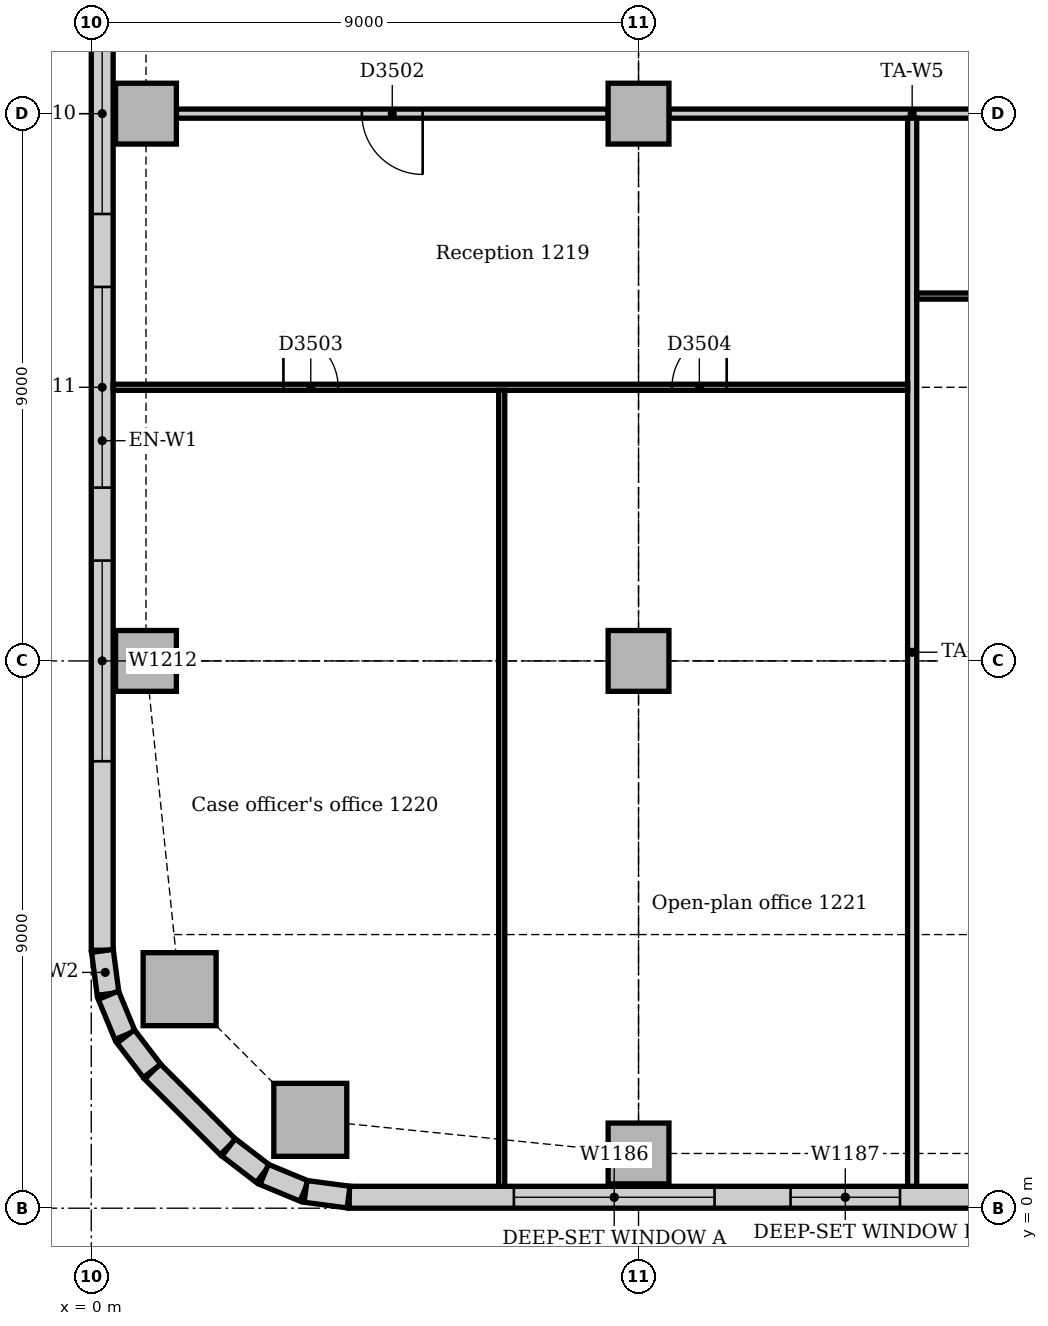
"""IFC4 building model, lengths in metres.
Left out: names, types, materials, properties, quantities, classifications, styles, units other than length and angle.
Written with IfcOpenShell. Run it as: python <this file> out.ifc"""

import sys

from ifc_helpers import new_model, si_unit, direction, frame, frame_2d, origin, origin_2d, place, context, subcontext, project, spatial, rectangle, extrude, element, fill, save


model = new_model("IFC4")
c1 = context("Model", 3, precision=1e-05, world=origin(), true_north=direction((0.0, 1.0)))
c2 = subcontext(c1, "Body", "Model", "MODEL_VIEW")
j1 = project(units=[si_unit("LENGTHUNIT", "METRE"), si_unit("PLANEANGLEUNIT", "RADIAN")], contexts=[c1])
p1 = place(None, origin())
s1 = spatial("IfcSite", under=j1, at=p1, CompositionType="ELEMENT")
p2 = place(p1, origin())
s2 = spatial("IfcBuilding", under=s1, at=p2, CompositionType="ELEMENT")
p3 = place(p2, frame((0.0, 0.0, 55.0)))
s3 = spatial("IfcBuildingStorey", under=s2, at=p3, CompositionType="ELEMENT", Elevation=55.0)
for number, where, z_axis, x_axis in (
    (1, (3.602, 1.453, 0.0), (0.0, 0.0, 1.0), (1.0, 0.0, 0.0)),
    (2, (1.453, 3.602, 0.0), (0.0, 0.0, 1.0), (1.0, 0.0, 0.0)),
):
    element("IfcColumn", number, at=place(p3, frame(where, z_axis=z_axis, x_axis=x_axis)), inside=s3, PredefinedType="COLUMN", context=c2, shape_type="SweptSolid", body=[
        extrude(rectangle(XDim=1.2, YDim=1.2, at=origin_2d()), origin(), (0.0, 0.0, 1.0), 3.85),
    ])
for number, where, z_axis, x_axis in (
    (3, (9.0, 0.9, 0.0), (0.0, 0.0, 1.0), (1.0, 0.0, 0.0)),
    (4, (0.9, 9.0, 0.0), (0.0, 0.0, 1.0), (1.0, 0.0, 0.0)),
    (5, (0.9, 18.0, 0.0), (0.0, 0.0, 1.0), (1.0, 0.0, 0.0)),
    (6, (9.0, 9.0, 0.0), (0.0, 0.0, 1.0), (1.0, 0.0, 0.0)),
    (7, (9.0, 18.0, 0.0), (0.0, 0.0, 1.0), (1.0, 0.0, 0.0)),
):
    element("IfcColumn", number, at=place(p3, frame(where, z_axis=z_axis, x_axis=x_axis)), inside=s3, PredefinedType="COLUMN", context=c2, shape_type="SweptSolid", body=[
        extrude(rectangle(XDim=1.0, YDim=1.0, at=origin_2d()), origin(), (0.0, 0.0, 1.0), 3.85),
    ])
p4 = place(p3, frame((4.243, 0.18, 0.0), z_axis=(0.0, 0.0, 1.0), x_axis=(1.0, 0.0, 0.0)))
e8 = element("IfcWall", 8, at=p4, inside=s3, PredefinedType="STANDARD", context=c2, shape_type="SweptSolid", body=[
    extrude(rectangle(XDim=44.015, YDim=0.36, at=frame_2d((22.007, 0.0))), origin(), (0.0, 0.0, 1.0), 3.85),
])
p5 = place(p4, frame((2.707, 0.0, 0.9)))
e9 = element("IfcOpeningElement", 9, at=p5, cuts=e8, PredefinedType="OPENING", context=c2, shape_type="SweptSolid", body=[
    extrude(rectangle(XDim=3.3, YDim=1.6, at=frame_2d((1.65, 0.8))), frame((0.0, 0.19, 0.0), z_axis=(0.0, -1.0, 0.0), x_axis=(1.0, 0.0, 0.0)), (0.0, 0.0, 1.0), 0.38),
])
p6 = place(p4, frame((7.257, 0.0, 0.9)))
e10 = element("IfcOpeningElement", 10, at=p6, cuts=e8, PredefinedType="OPENING", context=c2, shape_type="SweptSolid", body=[
    extrude(rectangle(XDim=1.8, YDim=1.6, at=frame_2d((0.9, 0.8))), frame((0.0, 0.19, 0.0), z_axis=(0.0, -1.0, 0.0), x_axis=(1.0, 0.0, 0.0)), (0.0, 0.0, 1.0), 0.38),
])
p7 = place(p4, frame((11.357, 0.0, 0.9)))
e11 = element("IfcOpeningElement", 11, at=p7, cuts=e8, PredefinedType="OPENING", context=c2, shape_type="SweptSolid", body=[
    extrude(rectangle(XDim=3.3, YDim=1.6, at=frame_2d((1.65, 0.8))), frame((0.0, 0.19, 0.0), z_axis=(0.0, -1.0, 0.0), x_axis=(1.0, 0.0, 0.0)), (0.0, 0.0, 1.0), 0.38),
])
p8 = place(p4, frame((15.857, 0.0, 0.9)))
e12 = element("IfcOpeningElement", 12, at=p8, cuts=e8, PredefinedType="OPENING", context=c2, shape_type="SweptSolid", body=[
    extrude(rectangle(XDim=3.3, YDim=1.6, at=frame_2d((1.65, 0.8))), frame((0.0, 0.19, 0.0), z_axis=(0.0, -1.0, 0.0), x_axis=(1.0, 0.0, 0.0)), (0.0, 0.0, 1.0), 0.38),
])
p9 = place(p4, frame((20.357, 0.0, 0.9)))
e13 = element("IfcOpeningElement", 13, at=p9, cuts=e8, PredefinedType="OPENING", context=c2, shape_type="SweptSolid", body=[
    extrude(rectangle(XDim=3.3, YDim=1.6, at=frame_2d((1.65, 0.8))), frame((0.0, 0.19, 0.0), z_axis=(0.0, -1.0, 0.0), x_axis=(1.0, 0.0, 0.0)), (0.0, 0.0, 1.0), 0.38),
])
p10 = place(p4, frame((25.307, 0.0, 0.9)))
e14 = element("IfcOpeningElement", 14, at=p10, cuts=e8, PredefinedType="OPENING", context=c2, shape_type="SweptSolid", body=[
    extrude(rectangle(XDim=1.8, YDim=1.6, at=frame_2d((0.9, 0.8))), frame((0.0, 0.19, 0.0), z_axis=(0.0, -1.0, 0.0), x_axis=(1.0, 0.0, 0.0)), (0.0, 0.0, 1.0), 0.38),
])
p11 = place(p4, frame((29.357, 0.0, 0.9)))
e15 = element("IfcOpeningElement", 15, at=p11, cuts=e8, PredefinedType="OPENING", context=c2, shape_type="SweptSolid", body=[
    extrude(rectangle(XDim=3.3, YDim=1.6, at=frame_2d((1.65, 0.8))), frame((0.0, 0.19, 0.0), z_axis=(0.0, -1.0, 0.0), x_axis=(1.0, 0.0, 0.0)), (0.0, 0.0, 1.0), 0.38),
])
p12 = place(p4, frame((33.857, 0.0, 0.9)))
e16 = element("IfcOpeningElement", 16, at=p12, cuts=e8, PredefinedType="OPENING", context=c2, shape_type="SweptSolid", body=[
    extrude(rectangle(XDim=3.3, YDim=1.6, at=frame_2d((1.65, 0.8))), frame((0.0, 0.19, 0.0), z_axis=(0.0, -1.0, 0.0), x_axis=(1.0, 0.0, 0.0)), (0.0, 0.0, 1.0), 0.38),
])
p13 = place(p4, frame((38.657, 0.0, 0.9)))
e17 = element("IfcOpeningElement", 17, at=p13, cuts=e8, PredefinedType="OPENING", context=c2, shape_type="SweptSolid", body=[
    extrude(rectangle(XDim=3.3, YDim=1.6, at=frame_2d((1.65, 0.8))), frame((0.0, 0.19, 0.0), z_axis=(0.0, -1.0, 0.0), x_axis=(1.0, 0.0, 0.0)), (0.0, 0.0, 1.0), 0.38),
])
p14 = place(p3, frame((0.18, 21.0, 0.0), z_axis=(0.0, 0.0, 1.0), x_axis=(0.0, -1.0, 0.0)))
e18 = element("IfcWall", 18, at=p14, inside=s3, PredefinedType="STANDARD", context=c2, shape_type="SweptSolid", body=[
    extrude(rectangle(XDim=16.757, YDim=0.36, at=frame_2d((8.379, 0.0))), origin(), (0.0, 0.0, 1.0), 3.85),
])
p15 = place(p14, frame((1.35, 0.0, 0.9)))
e19 = element("IfcOpeningElement", 19, at=p15, cuts=e18, PredefinedType="OPENING", context=c2, shape_type="SweptSolid", body=[
    extrude(rectangle(XDim=3.3, YDim=1.6, at=frame_2d((1.65, 0.8))), frame((0.0, 0.19, 0.0), z_axis=(0.0, -1.0, 0.0), x_axis=(1.0, 0.0, 0.0)), (0.0, 0.0, 1.0), 0.38),
])
p16 = place(p14, frame((5.85, 0.0, 0.9)))
e20 = element("IfcOpeningElement", 20, at=p16, cuts=e18, PredefinedType="OPENING", context=c2, shape_type="SweptSolid", body=[
    extrude(rectangle(XDim=3.3, YDim=1.6, at=frame_2d((1.65, 0.8))), frame((0.0, 0.19, 0.0), z_axis=(0.0, -1.0, 0.0), x_axis=(1.0, 0.0, 0.0)), (0.0, 0.0, 1.0), 0.38),
])
p17 = place(p14, frame((10.35, 0.0, 0.9)))
e21 = element("IfcOpeningElement", 21, at=p17, cuts=e18, PredefinedType="OPENING", context=c2, shape_type="SweptSolid", body=[
    extrude(rectangle(XDim=3.3, YDim=1.6, at=frame_2d((1.65, 0.8))), frame((0.0, 0.19, 0.0), z_axis=(0.0, -1.0, 0.0), x_axis=(1.0, 0.0, 0.0)), (0.0, 0.0, 1.0), 0.38),
])
p18 = place(p3, frame((1.006, 2.249, 0.0), z_axis=(0.0, 0.0, 1.0), x_axis=(0.707106781187, -0.707106781187, 0.0)))
e22 = element("IfcWall", 22, at=p18, inside=s3, PredefinedType="STANDARD", context=c2, shape_type="SweptSolid", body=[
    extrude(rectangle(XDim=1.757, YDim=0.36, at=frame_2d((0.879, 0.0))), origin(), (0.0, 0.0, 1.0), 3.85),
])
for number, where, z_axis, x_axis in (
    (23, (0.183, 4.231, 0.0), (0.0, 0.0, 1.0), (0.131, -0.991, 0.0)),
    (24, (0.282, 3.503, 0.0), (0.0, 0.0, 1.0), (0.383, -0.924, 0.0)),
):
    element("IfcWall", number, at=place(p3, frame(where, z_axis=z_axis, x_axis=x_axis)), inside=s3, PredefinedType="STANDARD", context=c2, shape_type="SweptSolid", body=[
        extrude(rectangle(XDim=0.713, YDim=0.36, at=frame_2d((0.356, 0.0))), origin(), (0.0, 0.0, 1.0), 3.85),
    ])
for number, where, z_axis, x_axis in (
    (25, (0.566, 2.825, 0.0), (0.0, 0.0, 1.0), (0.609, -0.793, 0.0)),
    (26, (2.259, 1.0, 0.0), (0.0, 0.0, 1.0), (0.793, -0.609, 0.0)),
):
    element("IfcWall", number, at=place(p3, frame(where, z_axis=z_axis, x_axis=x_axis)), inside=s3, PredefinedType="STANDARD", context=c2, shape_type="SweptSolid", body=[
        extrude(rectangle(XDim=0.713, YDim=0.36, at=frame_2d((0.357, 0.0))), origin(), (0.0, 0.0, 1.0), 3.85),
    ])
for number, where, z_axis, x_axis in (
    (27, (2.844, 0.555, 0.0), (0.0, 0.0, 1.0), (0.924, -0.383, 0.0)),
    (28, (3.524, 0.276, 0.0), (0.0, 0.0, 1.0), (0.991, -0.131, 0.0)),
):
    element("IfcWall", number, at=place(p3, frame(where, z_axis=z_axis, x_axis=x_axis)), inside=s3, PredefinedType="STANDARD", context=c2, shape_type="SweptSolid", body=[
        extrude(rectangle(XDim=0.713, YDim=0.36, at=frame_2d((0.356, 0.0))), origin(), (0.0, 0.0, 1.0), 3.85),
    ])
p19 = place(p3, frame((9.5, 18.0, 0.0), z_axis=(0.0, 0.0, 1.0), x_axis=(1.0, 0.0, 0.0)))
e29 = element("IfcWall", 29, at=p19, inside=s3, PredefinedType="PARTITIONING", context=c2, shape_type="SweptSolid", body=[
    extrude(rectangle(XDim=8.0, YDim=0.15, at=frame_2d((4.0, 0.0))), origin(), (0.0, 0.0, 1.0), 3.15),
])
p20 = place(p3, frame((1.4, 18.0, 0.0), z_axis=(0.0, 0.0, 1.0), x_axis=(1.0, 0.0, 0.0)))
e30 = element("IfcWall", 30, at=p20, inside=s3, PredefinedType="PARTITIONING", context=c2, shape_type="SweptSolid", body=[
    extrude(rectangle(XDim=7.1, YDim=0.15, at=frame_2d((3.55, 0.0))), origin(), (0.0, 0.0, 1.0), 3.15),
])
p21 = place(p20, frame((3.05, 0.0, 0.0)))
e31 = element("IfcOpeningElement", 31, at=p21, cuts=e30, PredefinedType="OPENING", context=c2, shape_type="SweptSolid", body=[
    extrude(rectangle(XDim=1.0, YDim=2.1, at=frame_2d((0.5, 1.05))), frame((0.0, 0.085, 0.0), z_axis=(0.0, -1.0, 0.0), x_axis=(1.0, 0.0, 0.0)), (0.0, 0.0, 1.0), 0.17),
])
p22 = place(p3, frame((13.5, 0.36, 0.0), z_axis=(0.0, 0.0, 1.0), x_axis=(0.0, 1.0, 0.0)))
e32 = element("IfcWall", 32, at=p22, inside=s3, PredefinedType="PARTITIONING", context=c2, shape_type="SweptSolid", body=[
    extrude(rectangle(XDim=17.565, YDim=0.15, at=frame_2d((8.783, 0.0))), origin(), (0.0, 0.0, 1.0), 3.85),
])
p23 = place(p3, frame((13.575, 15.0, 0.0), z_axis=(0.0, 0.0, 1.0), x_axis=(1.0, 0.0, 0.0)))
e33 = element("IfcWall", 33, at=p23, inside=s3, PredefinedType="PARTITIONING", context=c2, shape_type="SweptSolid", body=[
    extrude(rectangle(XDim=13.35, YDim=0.1, at=frame_2d((6.675, 0.0))), origin(), (0.0, 0.0, 1.0), 3.85),
])
p24 = place(p23, frame((6.2, 0.0, 0.0)))
e34 = element("IfcOpeningElement", 34, at=p24, cuts=e33, PredefinedType="OPENING", context=c2, shape_type="SweptSolid", body=[
    extrude(rectangle(XDim=0.9, YDim=2.1, at=frame_2d((0.45, 1.05))), frame((0.0, 0.06, 0.0), z_axis=(0.0, -1.0, 0.0), x_axis=(1.0, 0.0, 0.0)), (0.0, 0.0, 1.0), 0.12),
])
p25 = place(p3, frame((0.36, 13.5, 0.0), z_axis=(0.0, 0.0, 1.0), x_axis=(1.0, 0.0, 0.0)))
e35 = element("IfcWall", 35, at=p25, inside=s3, PredefinedType="PARTITIONING", context=c2, shape_type="SweptSolid", body=[
    extrude(rectangle(XDim=13.065, YDim=0.1, at=frame_2d((6.532, 0.0))), origin(), (0.0, 0.0, 1.0), 3.35),
])
p26 = place(p25, frame((2.8, 0.0, 0.0)))
e36 = element("IfcOpeningElement", 36, at=p26, cuts=e35, PredefinedType="OPENING", context=c2, shape_type="SweptSolid", body=[
    extrude(rectangle(XDim=0.9, YDim=2.1, at=frame_2d((0.45, 1.05))), frame((0.0, 0.06, 0.0), z_axis=(0.0, -1.0, 0.0), x_axis=(1.0, 0.0, 0.0)), (0.0, 0.0, 1.0), 0.12),
])
p27 = place(p25, frame((9.19, 0.0, 0.0)))
e37 = element("IfcOpeningElement", 37, at=p27, cuts=e35, PredefinedType="OPENING", context=c2, shape_type="SweptSolid", body=[
    extrude(rectangle(XDim=0.9, YDim=2.1, at=frame_2d((0.45, 1.05))), frame((0.0, 0.06, 0.0), z_axis=(0.0, -1.0, 0.0), x_axis=(1.0, 0.0, 0.0)), (0.0, 0.0, 1.0), 0.12),
])
p28 = place(p3, frame((6.75, 0.36, 0.0), z_axis=(0.0, 0.0, 1.0), x_axis=(0.0, 1.0, 0.0)))
e38 = element("IfcWall", 38, at=p28, inside=s3, PredefinedType="PARTITIONING", context=c2, shape_type="SweptSolid", body=[
    extrude(rectangle(XDim=13.09, YDim=0.1, at=frame_2d((6.545, 0.0))), origin(), (0.0, 0.0, 1.0), 3.85),
])
p29 = place(p5, origin())
e39 = element("IfcWindow", 39, at=p29, inside=s3, PartitioningType="SINGLE_PANEL", PredefinedType="WINDOW", context=c2, shape_type="SweptSolid", body=[
    extrude(rectangle(XDim=3.3, YDim=1.6, at=frame_2d((1.65, 0.8))), frame((0.0, 0.13, 0.0), z_axis=(0.0, -1.0, 0.0), x_axis=(1.0, 0.0, 0.0)), (0.0, 0.0, 1.0), 0.06),
])
fill(e9, e39)
p30 = place(p6, origin())
e40 = element("IfcWindow", 40, at=p30, inside=s3, PartitioningType="SINGLE_PANEL", PredefinedType="WINDOW", context=c2, shape_type="SweptSolid", body=[
    extrude(rectangle(XDim=1.8, YDim=1.6, at=frame_2d((0.9, 0.8))), frame((0.0, 0.13, 0.0), z_axis=(0.0, -1.0, 0.0), x_axis=(1.0, 0.0, 0.0)), (0.0, 0.0, 1.0), 0.06),
])
fill(e10, e40)
p31 = place(p15, origin())
e41 = element("IfcWindow", 41, at=p31, inside=s3, PartitioningType="SINGLE_PANEL", PredefinedType="WINDOW", context=c2, shape_type="SweptSolid", body=[
    extrude(rectangle(XDim=3.3, YDim=1.6, at=frame_2d((1.65, 0.8))), frame((0.0, 0.13, 0.0), z_axis=(0.0, -1.0, 0.0), x_axis=(1.0, 0.0, 0.0)), (0.0, 0.0, 1.0), 0.06),
])
fill(e19, e41)
p32 = place(p16, origin())
e42 = element("IfcWindow", 42, at=p32, inside=s3, PartitioningType="SINGLE_PANEL", PredefinedType="WINDOW", context=c2, shape_type="SweptSolid", body=[
    extrude(rectangle(XDim=3.3, YDim=1.6, at=frame_2d((1.65, 0.8))), frame((0.0, 0.13, 0.0), z_axis=(0.0, -1.0, 0.0), x_axis=(1.0, 0.0, 0.0)), (0.0, 0.0, 1.0), 0.06),
])
fill(e20, e42)
p33 = place(p17, origin())
e43 = element("IfcWindow", 43, at=p33, inside=s3, PartitioningType="SINGLE_PANEL", PredefinedType="WINDOW", context=c2, shape_type="SweptSolid", body=[
    extrude(rectangle(XDim=3.3, YDim=1.6, at=frame_2d((1.65, 0.8))), frame((0.0, 0.13, 0.0), z_axis=(0.0, -1.0, 0.0), x_axis=(1.0, 0.0, 0.0)), (0.0, 0.0, 1.0), 0.06),
])
fill(e21, e43)
p34 = place(p21, frame((1.0, 0.0, 0.0), z_axis=(0.0, 0.0, 1.0), x_axis=(-1.0, 0.0, 0.0)))
e44 = element("IfcDoor", 44, at=p34, inside=s3, OperationType="SINGLE_SWING_LEFT", PredefinedType="DOOR", context=c2, shape_type="SweptSolid", body=[
    extrude(rectangle(XDim=1.0, YDim=2.1, at=frame_2d((0.5, 1.05))), frame((0.0, 0.025, 0.0), z_axis=(0.0, -1.0, 0.0), x_axis=(1.0, 0.0, 0.0)), (0.0, 0.0, 1.0), 0.05),
])
fill(e31, e44)
p35 = place(p26, origin())
e45 = element("IfcDoor", 45, at=p35, inside=s3, OperationType="SINGLE_SWING_LEFT", PredefinedType="DOOR", context=c2, shape_type="SweptSolid", body=[
    extrude(rectangle(XDim=0.9, YDim=2.1, at=frame_2d((0.45, 1.05))), frame((0.0, 0.025, 0.0), z_axis=(0.0, -1.0, 0.0), x_axis=(1.0, 0.0, 0.0)), (0.0, 0.0, 1.0), 0.05),
])
fill(e36, e45)
p36 = place(p27, origin())
e46 = element("IfcDoor", 46, at=p36, inside=s3, OperationType="SINGLE_SWING_RIGHT", PredefinedType="DOOR", context=c2, shape_type="SweptSolid", body=[
    extrude(rectangle(XDim=0.9, YDim=2.1, at=frame_2d((0.45, 1.05))), frame((0.0, 0.025, 0.0), z_axis=(0.0, -1.0, 0.0), x_axis=(1.0, 0.0, 0.0)), (0.0, 0.0, 1.0), 0.05),
])
fill(e37, e46)
save(model, sys.argv[1])
